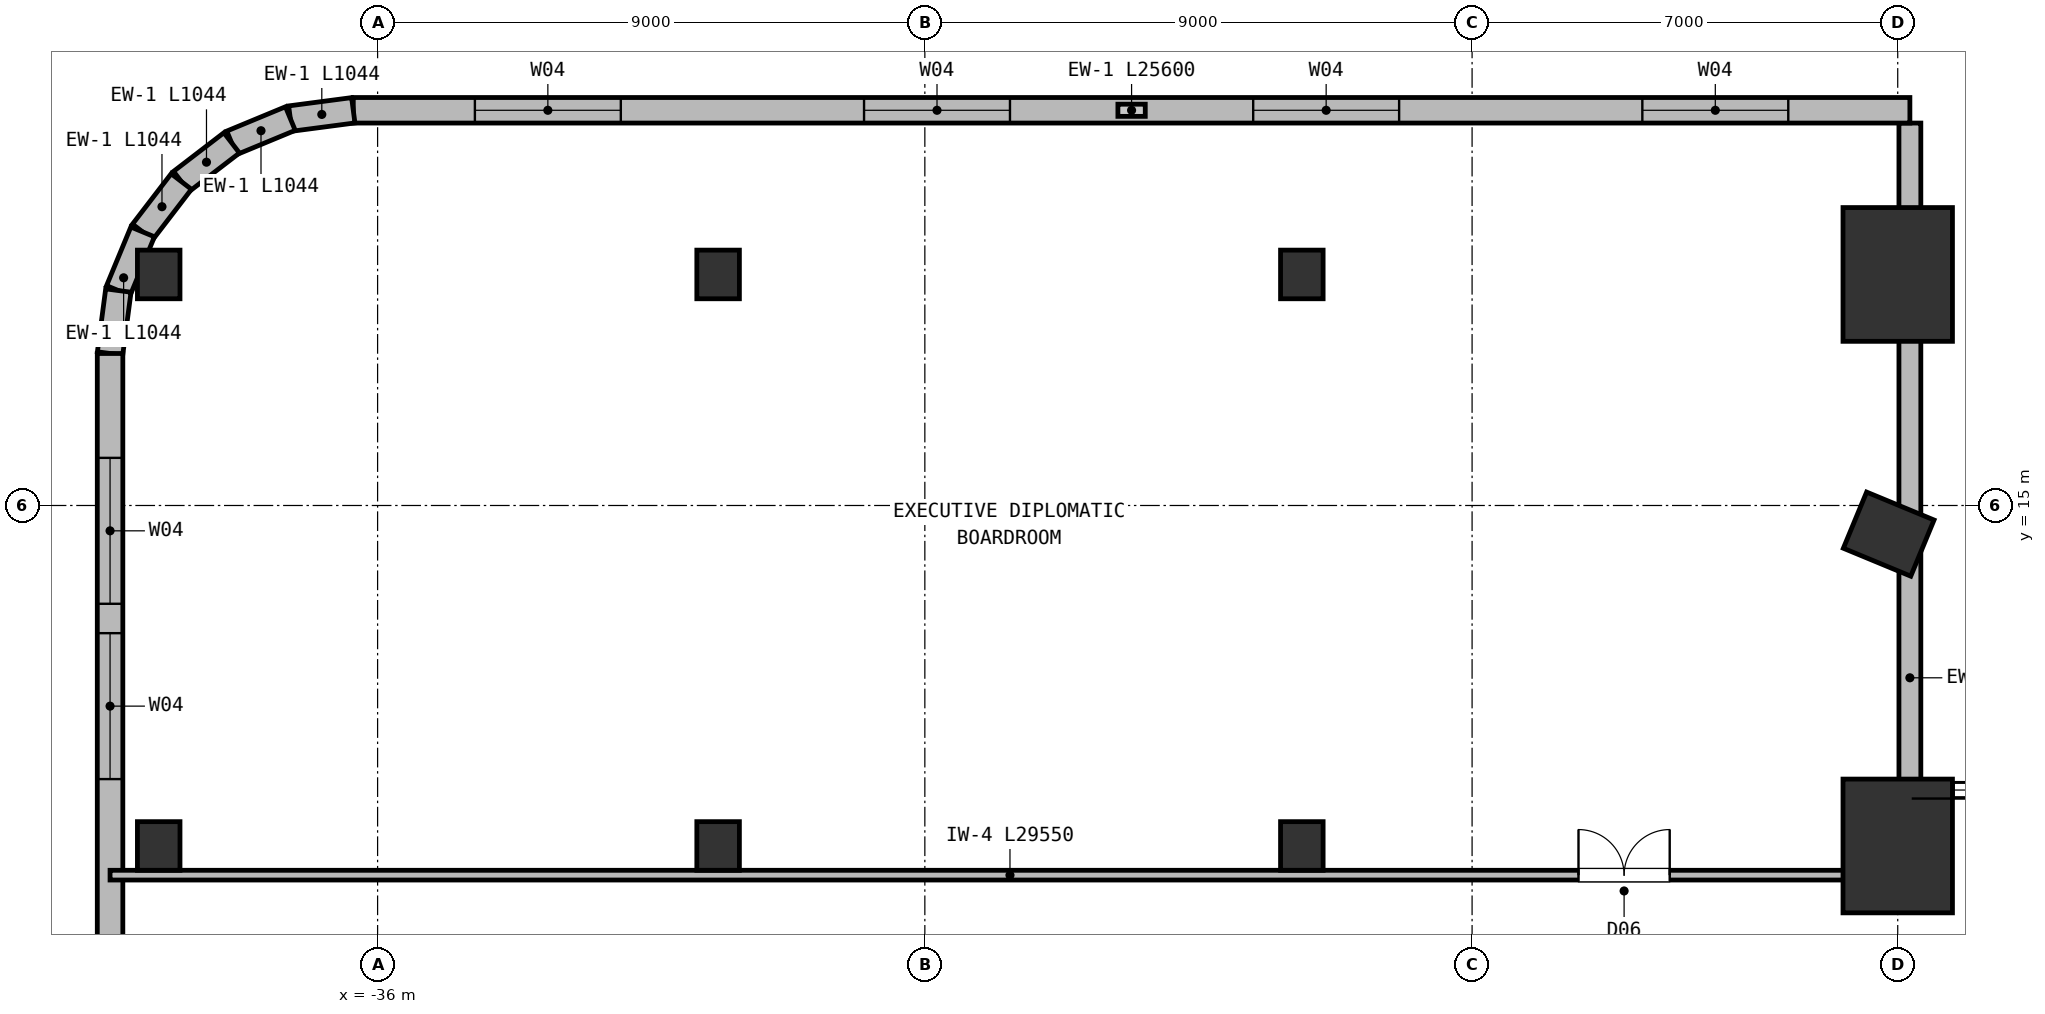
"""IFC4 building model, lengths in metres.
Left out: names, types, materials, properties, quantities, classifications, styles, units other than length and angle.
Written with IfcOpenShell. Run it as: python <this file> out.ifc"""

import sys

from ifc_helpers import new_model, si_unit, direction, frame, frame_2d, origin, origin_2d, place, context, subcontext, project, spatial, rectangle, extrude, element, fill, save


model = new_model("IFC4")
c1 = context("Model", 3, precision=1e-05, world=origin(), true_north=direction((0.0, 1.0)))
c2 = subcontext(c1, "Body", "Model", "MODEL_VIEW")
j1 = project(units=[si_unit("LENGTHUNIT", "METRE"), si_unit("PLANEANGLEUNIT", "RADIAN")], contexts=[c1])
p1 = place(None, origin())
s1 = spatial("IfcSite", under=j1, at=p1, CompositionType="ELEMENT")
p2 = place(p1, origin())
s2 = spatial("IfcBuilding", under=s1, at=p2, CompositionType="ELEMENT")
p3 = place(p2, frame((0.0, 0.0, 11.0)))
s3 = spatial("IfcBuildingStorey", under=s2, at=p3, CompositionType="ELEMENT", Elevation=11.0)
p4 = place(p3, frame((-11.148, 14.529, 0.0), z_axis=(0.0, 0.0, 1.0), x_axis=(0.382683432365, 0.923879532511, 0.0)))
e1 = element("IfcColumn", 1, at=p4, inside=s3, PredefinedType="COLUMN", context=c2, shape_type="SweptSolid", body=[
    extrude(rectangle(XDim=1.0, YDim=1.2, at=origin_2d()), origin(), (0.0, 0.0, 1.0), 5.0),
])
for number, where, z_axis, x_axis in (
    (2, (-39.6, 9.4, 0.0), (0.0, 0.0, 1.0), (1.0, 0.0, 0.0)),
    (3, (-39.6, 18.8, 0.0), (0.0, 0.0, 1.0), (1.0, 0.0, 0.0)),
    (4, (-30.4, 9.4, 0.0), (0.0, 0.0, 1.0), (1.0, 0.0, 0.0)),
    (5, (-30.4, 18.8, 0.0), (0.0, 0.0, 1.0), (1.0, 0.0, 0.0)),
    (6, (-20.8, 9.4, 0.0), (0.0, 0.0, 1.0), (1.0, 0.0, 0.0)),
    (7, (-20.8, 18.8, 0.0), (0.0, 0.0, 1.0), (1.0, 0.0, 0.0)),
):
    element("IfcColumn", number, at=place(p3, frame(where, z_axis=z_axis, x_axis=x_axis)), inside=s3, PredefinedType="COLUMN", context=c2, shape_type="SweptSolid", body=[
        extrude(rectangle(XDim=0.7, YDim=0.8, at=origin_2d()), origin(), (0.0, 0.0, 1.0), 5.0),
    ])
for number, where, z_axis, x_axis in (
    (8, (-11.0, 9.4, 0.0), (0.0, 0.0, 1.0), (1.0, 0.0, 0.0)),
    (9, (-11.0, 18.8, 0.0), (0.0, 0.0, 1.0), (1.0, 0.0, 0.0)),
):
    element("IfcColumn", number, at=place(p3, frame(where, z_axis=z_axis, x_axis=x_axis)), inside=s3, PredefinedType="COLUMN", context=c2, shape_type="SweptSolid", body=[
        extrude(rectangle(XDim=1.8, YDim=2.2, at=origin_2d()), origin(), (0.0, 0.0, 1.0), 5.0),
    ])
p5 = place(p3, frame((-10.8, 10.32, 0.0), z_axis=(0.0, 0.0, 1.0), x_axis=(0.0, 1.0, 0.0)))
e10 = element("IfcWall", 10, at=p5, inside=s3, PredefinedType="SOLIDWALL", context=c2, shape_type="SweptSolid", body=[
    extrude(rectangle(XDim=10.97, YDim=0.36, at=frame_2d((5.485, 0.0))), origin(), (0.0, 0.0, 1.0), 2.84),
])
p6 = place(p3, frame((-36.4, 21.5, 0.0), z_axis=(0.0, 0.0, 1.0), x_axis=(1.0, 0.0, 0.0)))
e11 = element("IfcWall", 11, at=p6, inside=s3, PredefinedType="SOLIDWALL", context=c2, shape_type="SweptSolid", body=[
    extrude(rectangle(XDim=25.6, YDim=0.42, at=frame_2d((12.8, 0.0))), origin(), (0.0, 0.0, 1.0), 4.66),
])
p7 = place(p6, frame((2.0, 0.0, 0.95)))
e12 = element("IfcOpeningElement", 12, at=p7, cuts=e11, PredefinedType="OPENING", context=c2, shape_type="SweptSolid", body=[
    extrude(rectangle(XDim=2.4, YDim=2.6, at=frame_2d((1.2, 1.3))), frame((0.0, 0.22, 0.0), z_axis=(0.0, -1.0, 0.0), x_axis=(1.0, 0.0, 0.0)), (0.0, 0.0, 1.0), 0.44),
])
p8 = place(p6, frame((8.4, 0.0, 0.95)))
e13 = element("IfcOpeningElement", 13, at=p8, cuts=e11, PredefinedType="OPENING", context=c2, shape_type="SweptSolid", body=[
    extrude(rectangle(XDim=2.4, YDim=2.6, at=frame_2d((1.2, 1.3))), frame((0.0, 0.22, 0.0), z_axis=(0.0, -1.0, 0.0), x_axis=(1.0, 0.0, 0.0)), (0.0, 0.0, 1.0), 0.44),
])
p9 = place(p6, frame((14.8, 0.0, 0.95)))
e14 = element("IfcOpeningElement", 14, at=p9, cuts=e11, PredefinedType="OPENING", context=c2, shape_type="SweptSolid", body=[
    extrude(rectangle(XDim=2.4, YDim=2.6, at=frame_2d((1.2, 1.3))), frame((0.0, 0.22, 0.0), z_axis=(0.0, -1.0, 0.0), x_axis=(1.0, 0.0, 0.0)), (0.0, 0.0, 1.0), 0.44),
])
p10 = place(p6, frame((21.2, 0.0, 0.95)))
e15 = element("IfcOpeningElement", 15, at=p10, cuts=e11, PredefinedType="OPENING", context=c2, shape_type="SweptSolid", body=[
    extrude(rectangle(XDim=2.4, YDim=2.6, at=frame_2d((1.2, 1.3))), frame((0.0, 0.22, 0.0), z_axis=(0.0, -1.0, 0.0), x_axis=(1.0, 0.0, 0.0)), (0.0, 0.0, 1.0), 0.44),
])
p11 = place(p3, frame((-37.435, 21.364, 0.0), z_axis=(0.0, 0.0, 1.0), x_axis=(0.991455091231, 0.130448465198, 0.0)))
e16 = element("IfcWall", 16, at=p11, inside=s3, PredefinedType="SOLIDWALL", context=c2, shape_type="SweptSolid", body=[
    extrude(rectangle(XDim=1.044, YDim=0.42, at=frame_2d((0.522, 0.0))), origin(), (0.0, 0.0, 1.0), 4.66),
])
p12 = place(p3, frame((-38.4, 20.964, 0.0), z_axis=(0.0, 0.0, 1.0), x_axis=(0.923842970528, 0.382771688877, 0.0)))
e17 = element("IfcWall", 17, at=p12, inside=s3, PredefinedType="SOLIDWALL", context=c2, shape_type="SweptSolid", body=[
    extrude(rectangle(XDim=1.044, YDim=0.42, at=frame_2d((0.522, 0.0))), origin(), (0.0, 0.0, 1.0), 4.66),
])
p13 = place(p3, frame((-39.229, 20.328, 0.0), z_axis=(0.0, 0.0, 1.0), x_axis=(0.793388088797, 0.608716141198, 0.0)))
e18 = element("IfcWall", 18, at=p13, inside=s3, PredefinedType="SOLIDWALL", context=c2, shape_type="SweptSolid", body=[
    extrude(rectangle(XDim=1.044, YDim=0.42, at=frame_2d((0.522, 0.0))), origin(), (0.0, 0.0, 1.0), 4.66),
])
p14 = place(p3, frame((-39.864, 19.5, 0.0), z_axis=(0.0, 0.0, 1.0), x_axis=(0.608681879412, 0.793414374508, 0.0)))
e19 = element("IfcWall", 19, at=p14, inside=s3, PredefinedType="SOLIDWALL", context=c2, shape_type="SweptSolid", body=[
    extrude(rectangle(XDim=1.044, YDim=0.42, at=frame_2d((0.522, 0.0))), origin(), (0.0, 0.0, 1.0), 4.66),
])
p15 = place(p3, frame((-40.264, 18.535, 0.0), z_axis=(0.0, 0.0, 1.0), x_axis=(0.382771688877, 0.923842970528, 0.0)))
e20 = element("IfcWall", 20, at=p15, inside=s3, PredefinedType="SOLIDWALL", context=c2, shape_type="SweptSolid", body=[
    extrude(rectangle(XDim=1.044, YDim=0.42, at=frame_2d((0.522, 0.0))), origin(), (0.0, 0.0, 1.0), 4.66),
])
p16 = place(p3, frame((-40.4, 17.5, 0.0), z_axis=(0.0, 0.0, 1.0), x_axis=(0.130448465198, 0.991455091231, 0.0)))
e21 = element("IfcWall", 21, at=p16, inside=s3, PredefinedType="SOLIDWALL", context=c2, shape_type="SweptSolid", body=[
    extrude(rectangle(XDim=1.044, YDim=0.42, at=frame_2d((0.522, 0.0))), origin(), (0.0, 0.0, 1.0), 4.66),
])
p17 = place(p3, frame((-40.4, -17.5, 0.0), z_axis=(0.0, 0.0, 1.0), x_axis=(0.0, 1.0, 0.0)))
e22 = element("IfcWall", 22, at=p17, inside=s3, PredefinedType="SOLIDWALL", context=c2, shape_type="SweptSolid", body=[
    extrude(rectangle(XDim=35.0, YDim=0.42, at=frame_2d((17.5, 0.0))), origin(), (0.0, 0.0, 1.0), 4.66),
])
p18 = place(p17, frame((1.717, 0.0, 0.95)))
e23 = element("IfcOpeningElement", 23, at=p18, cuts=e22, PredefinedType="OPENING", context=c2, shape_type="SweptSolid", body=[
    extrude(rectangle(XDim=2.4, YDim=2.6, at=frame_2d((1.2, 1.3))), frame((0.0, 0.22, 0.0), z_axis=(0.0, -1.0, 0.0), x_axis=(1.0, 0.0, 0.0)), (0.0, 0.0, 1.0), 0.44),
])
p19 = place(p17, frame((4.6, 0.0, 0.95)))
e24 = element("IfcOpeningElement", 24, at=p19, cuts=e22, PredefinedType="OPENING", context=c2, shape_type="SweptSolid", body=[
    extrude(rectangle(XDim=2.4, YDim=2.6, at=frame_2d((1.2, 1.3))), frame((0.0, 0.22, 0.0), z_axis=(0.0, -1.0, 0.0), x_axis=(1.0, 0.0, 0.0)), (0.0, 0.0, 1.0), 0.44),
])
p20 = place(p17, frame((13.383, 0.0, 0.95)))
e25 = element("IfcOpeningElement", 25, at=p20, cuts=e22, PredefinedType="OPENING", context=c2, shape_type="SweptSolid", body=[
    extrude(rectangle(XDim=2.4, YDim=2.6, at=frame_2d((1.2, 1.3))), frame((0.0, 0.22, 0.0), z_axis=(0.0, -1.0, 0.0), x_axis=(1.0, 0.0, 0.0)), (0.0, 0.0, 1.0), 0.44),
])
p21 = place(p17, frame((19.217, 0.0, 0.95)))
e26 = element("IfcOpeningElement", 26, at=p21, cuts=e22, PredefinedType="OPENING", context=c2, shape_type="SweptSolid", body=[
    extrude(rectangle(XDim=2.4, YDim=2.6, at=frame_2d((1.2, 1.3))), frame((0.0, 0.22, 0.0), z_axis=(0.0, -1.0, 0.0), x_axis=(1.0, 0.0, 0.0)), (0.0, 0.0, 1.0), 0.44),
])
p22 = place(p17, frame((28.0, 0.0, 0.95)))
e27 = element("IfcOpeningElement", 27, at=p22, cuts=e22, PredefinedType="OPENING", context=c2, shape_type="SweptSolid", body=[
    extrude(rectangle(XDim=2.4, YDim=2.6, at=frame_2d((1.2, 1.3))), frame((0.0, 0.22, 0.0), z_axis=(0.0, -1.0, 0.0), x_axis=(1.0, 0.0, 0.0)), (0.0, 0.0, 1.0), 0.44),
])
p23 = place(p17, frame((30.883, 0.0, 0.95)))
e28 = element("IfcOpeningElement", 28, at=p23, cuts=e22, PredefinedType="OPENING", context=c2, shape_type="SweptSolid", body=[
    extrude(rectangle(XDim=2.4, YDim=2.6, at=frame_2d((1.2, 1.3))), frame((0.0, 0.22, 0.0), z_axis=(0.0, -1.0, 0.0), x_axis=(1.0, 0.0, 0.0)), (0.0, 0.0, 1.0), 0.44),
])
p24 = place(p3, frame((-40.4, 8.92, 0.0), z_axis=(0.0, 0.0, 1.0), x_axis=(1.0, 0.0, 0.0)))
e29 = element("IfcWall", 29, at=p24, inside=s3, PredefinedType="PARTITIONING", context=c2, shape_type="SweptSolid", body=[
    extrude(rectangle(XDim=29.55, YDim=0.16, at=frame_2d((14.775, 0.0))), origin(), (0.0, 0.0, 1.0), 4.66),
])
p25 = place(p24, frame((24.15, 0.0, 0.0)))
e30 = element("IfcOpeningElement", 30, at=p25, cuts=e29, PredefinedType="OPENING", context=c2, shape_type="SweptSolid", body=[
    extrude(rectangle(XDim=1.5, YDim=2.2, at=frame_2d((0.75, 1.1))), frame((0.0, 0.09, 0.0), z_axis=(0.0, -1.0, 0.0), x_axis=(1.0, 0.0, 0.0)), (0.0, 0.0, 1.0), 0.18),
])
p26 = place(p7, origin())
e31 = element("IfcWindow", 31, at=p26, inside=s3, PartitioningType="SINGLE_PANEL", PredefinedType="WINDOW", context=c2, shape_type="SweptSolid", body=[
    extrude(rectangle(XDim=2.4, YDim=2.6, at=frame_2d((1.2, 1.3))), frame((0.0, 0.03, 0.0), z_axis=(0.0, -1.0, 0.0), x_axis=(1.0, 0.0, 0.0)), (0.0, 0.0, 1.0), 0.06),
])
fill(e12, e31)
p27 = place(p8, origin())
e32 = element("IfcWindow", 32, at=p27, inside=s3, PartitioningType="SINGLE_PANEL", PredefinedType="WINDOW", context=c2, shape_type="SweptSolid", body=[
    extrude(rectangle(XDim=2.4, YDim=2.6, at=frame_2d((1.2, 1.3))), frame((0.0, 0.03, 0.0), z_axis=(0.0, -1.0, 0.0), x_axis=(1.0, 0.0, 0.0)), (0.0, 0.0, 1.0), 0.06),
])
fill(e13, e32)
p28 = place(p9, origin())
e33 = element("IfcWindow", 33, at=p28, inside=s3, PartitioningType="SINGLE_PANEL", PredefinedType="WINDOW", context=c2, shape_type="SweptSolid", body=[
    extrude(rectangle(XDim=2.4, YDim=2.6, at=frame_2d((1.2, 1.3))), frame((0.0, 0.03, 0.0), z_axis=(0.0, -1.0, 0.0), x_axis=(1.0, 0.0, 0.0)), (0.0, 0.0, 1.0), 0.06),
])
fill(e14, e33)
p29 = place(p10, origin())
e34 = element("IfcWindow", 34, at=p29, inside=s3, PartitioningType="SINGLE_PANEL", PredefinedType="WINDOW", context=c2, shape_type="SweptSolid", body=[
    extrude(rectangle(XDim=2.4, YDim=2.6, at=frame_2d((1.2, 1.3))), frame((0.0, 0.03, 0.0), z_axis=(0.0, -1.0, 0.0), x_axis=(1.0, 0.0, 0.0)), (0.0, 0.0, 1.0), 0.06),
])
fill(e15, e34)
p30 = place(p22, origin())
e35 = element("IfcWindow", 35, at=p30, inside=s3, PartitioningType="SINGLE_PANEL", PredefinedType="WINDOW", context=c2, shape_type="SweptSolid", body=[
    extrude(rectangle(XDim=2.4, YDim=2.6, at=frame_2d((1.2, 1.3))), frame((0.0, 0.03, 0.0), z_axis=(0.0, -1.0, 0.0), x_axis=(1.0, 0.0, 0.0)), (0.0, 0.0, 1.0), 0.06),
])
fill(e27, e35)
p31 = place(p23, origin())
e36 = element("IfcWindow", 36, at=p31, inside=s3, PartitioningType="SINGLE_PANEL", PredefinedType="WINDOW", context=c2, shape_type="SweptSolid", body=[
    extrude(rectangle(XDim=2.4, YDim=2.6, at=frame_2d((1.2, 1.3))), frame((0.0, 0.03, 0.0), z_axis=(0.0, -1.0, 0.0), x_axis=(1.0, 0.0, 0.0)), (0.0, 0.0, 1.0), 0.06),
])
fill(e28, e36)
p32 = place(p25, origin())
e37 = element("IfcDoor", 37, at=p32, inside=s3, OperationType="DOUBLE_DOOR_SINGLE_SWING", PredefinedType="DOOR", context=c2, shape_type="SweptSolid", body=[
    extrude(rectangle(XDim=1.5, YDim=2.2, at=frame_2d((0.75, 1.1))), frame((0.0, 0.025, 0.0), z_axis=(0.0, -1.0, 0.0), x_axis=(1.0, 0.0, 0.0)), (0.0, 0.0, 1.0), 0.05),
])
fill(e30, e37)
save(model, sys.argv[1])
